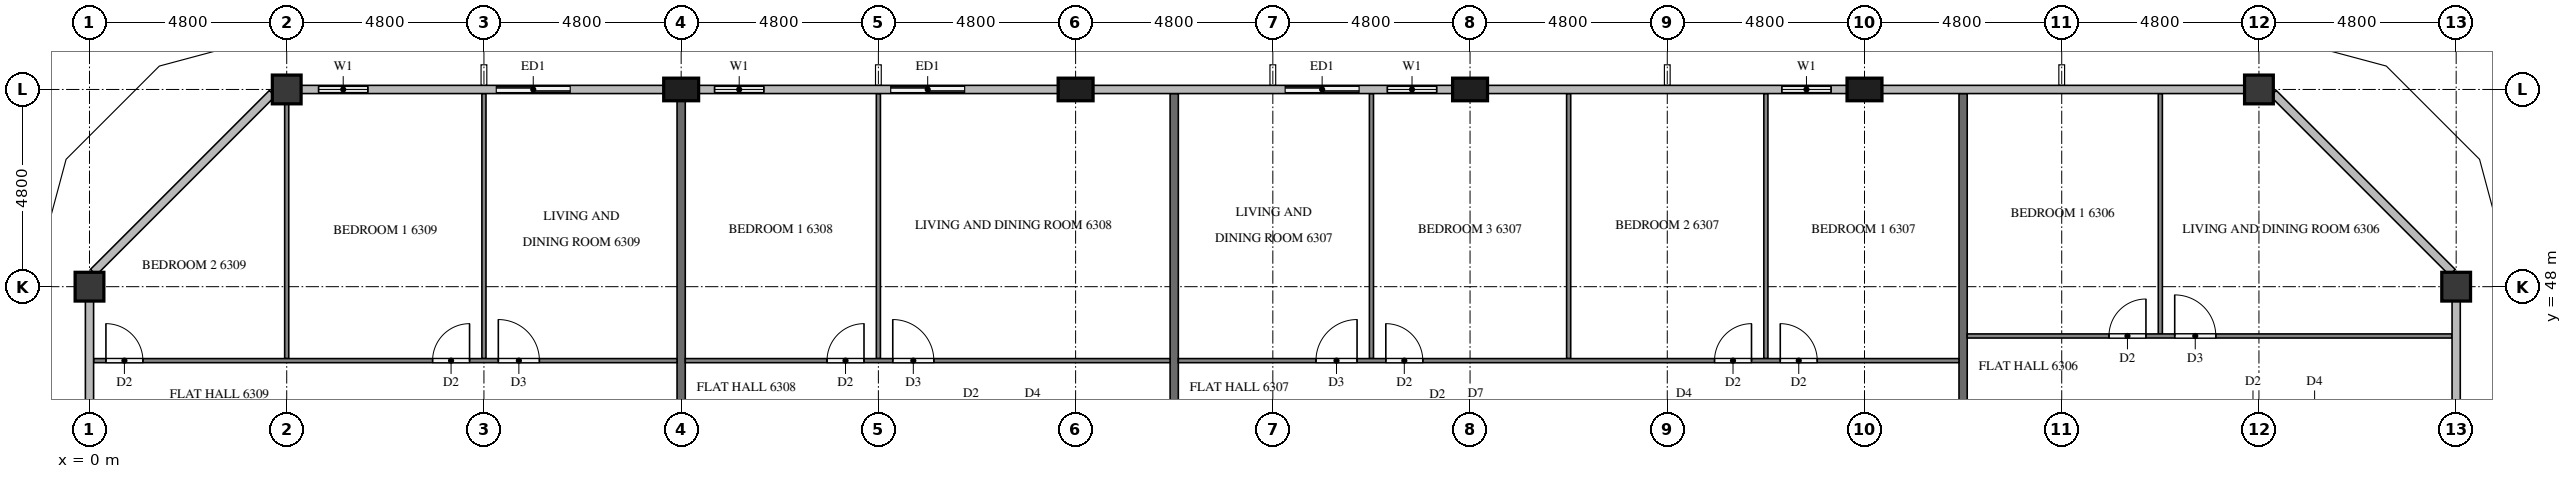
"""IFC4 building model, lengths in metres.
Left out: names, types, materials, properties, quantities, classifications, styles, units other than length and angle.
Written with IfcOpenShell. Run it as: python <this file> out.ifc"""

import sys

from ifc_helpers import new_model, si_unit, direction, frame, frame_2d, origin, origin_2d, place, context, subcontext, project, spatial, rectangle, extrude, element, fill, save


model = new_model("IFC4")
c1 = context("Model", 3, precision=1e-05, world=origin(), true_north=direction((0.0, 1.0)))
c2 = subcontext(c1, "Body", "Model", "MODEL_VIEW")
j1 = project(units=[si_unit("LENGTHUNIT", "METRE"), si_unit("PLANEANGLEUNIT", "RADIAN")], contexts=[c1])
p1 = place(None, origin())
s1 = spatial("IfcSite", under=j1, at=p1, CompositionType="ELEMENT")
p2 = place(p1, origin())
s2 = spatial("IfcBuilding", under=s1, at=p2, CompositionType="ELEMENT")
p3 = place(p2, frame((0.0, 0.0, 242.2)))
s3 = spatial("IfcBuildingStorey", under=s2, at=p3, CompositionType="ELEMENT", Elevation=242.2)
for number, where, z_axis, x_axis in (
    (1, (57.6, 48.0, 0.0), (0.0, 0.0, 1.0), (1.0, 0.0, 0.0)),
    (2, (52.8, 52.8, 0.0), (0.0, 0.0, 1.0), (1.0, 0.0, 0.0)),
):
    element("IfcColumn", number, at=place(p3, frame(where, z_axis=z_axis, x_axis=x_axis)), inside=s3, PredefinedType="COLUMN", context=c2, shape_type="SweptSolid", body=[
        extrude(rectangle(XDim=0.7, YDim=0.7, at=origin_2d()), origin(), (0.0, 0.0, 1.0), 3.2),
    ])
for number, where, z_axis, x_axis in (
    (3, (43.2, 52.8, 0.0), (0.0, 0.0, 1.0), (1.0, 0.0, 0.0)),
    (4, (33.6, 52.8, 0.0), (0.0, 0.0, 1.0), (1.0, 0.0, 0.0)),
    (5, (24.0, 52.8, 0.0), (0.0, 0.0, 1.0), (1.0, 0.0, 0.0)),
    (6, (14.4, 52.8, 0.0), (0.0, 0.0, 1.0), (1.0, 0.0, 0.0)),
):
    element("IfcColumn", number, at=place(p3, frame(where, z_axis=z_axis, x_axis=x_axis)), inside=s3, PredefinedType="COLUMN", context=c2, shape_type="SweptSolid", body=[
        extrude(rectangle(XDim=0.85, YDim=0.55, at=origin_2d()), origin(), (0.0, 0.0, 1.0), 3.2),
    ])
for number, where, z_axis, x_axis in (
    (7, (4.8, 52.8, 0.0), (0.0, 0.0, 1.0), (1.0, 0.0, 0.0)),
    (8, (0.0, 48.0, 0.0), (0.0, 0.0, 1.0), (1.0, 0.0, 0.0)),
):
    element("IfcColumn", number, at=place(p3, frame(where, z_axis=z_axis, x_axis=x_axis)), inside=s3, PredefinedType="COLUMN", context=c2, shape_type="SweptSolid", body=[
        extrude(rectangle(XDim=0.7, YDim=0.7, at=origin_2d()), origin(), (0.0, 0.0, 1.0), 3.2),
    ])
p4 = place(p3, frame((42.775, 52.8, 0.0), z_axis=(0.0, 0.0, 1.0), x_axis=(-1.0, 0.0, 0.0)))
e9 = element("IfcWall", 9, at=p4, inside=s3, PredefinedType="SOLIDWALL", context=c2, shape_type="SweptSolid", body=[
    extrude(rectangle(XDim=1.975, YDim=0.15, at=frame_2d((0.987, 0.0))), origin(), (0.0, 0.0, 1.0), 3.2),
])
p5 = place(p4, frame((0.387, 0.0, 0.9)))
e10 = element("IfcOpeningElement", 10, at=p5, cuts=e9, PredefinedType="OPENING", context=c2, shape_type="SweptSolid", body=[
    extrude(rectangle(XDim=1.2, YDim=1.4, at=frame_2d((0.6, 0.7))), frame((0.0, 0.085, 0.0), z_axis=(0.0, -1.0, 0.0), x_axis=(1.0, 0.0, 0.0)), (0.0, 0.0, 1.0), 0.17),
])
p6 = place(p3, frame((33.175, 52.8, 0.0), z_axis=(0.0, 0.0, 1.0), x_axis=(-1.0, 0.0, 0.0)))
e11 = element("IfcWall", 11, at=p6, inside=s3, PredefinedType="SOLIDWALL", context=c2, shape_type="SweptSolid", body=[
    extrude(rectangle(XDim=4.375, YDim=0.15, at=frame_2d((2.188, 0.0))), origin(), (0.0, 0.0, 1.0), 3.2),
])
p7 = place(p6, frame((0.387, 0.0, 0.9)))
e12 = element("IfcOpeningElement", 12, at=p7, cuts=e11, PredefinedType="OPENING", context=c2, shape_type="SweptSolid", body=[
    extrude(rectangle(XDim=1.2, YDim=1.4, at=frame_2d((0.6, 0.7))), frame((0.0, 0.085, 0.0), z_axis=(0.0, -1.0, 0.0), x_axis=(1.0, 0.0, 0.0)), (0.0, 0.0, 1.0), 0.17),
])
p8 = place(p6, frame((2.275, 0.0, 0.0)))
e13 = element("IfcOpeningElement", 13, at=p8, cuts=e11, PredefinedType="OPENING", context=c2, shape_type="SweptSolid", body=[
    extrude(rectangle(XDim=1.8, YDim=2.4, at=frame_2d((0.9, 1.2))), frame((0.0, 0.085, 0.0), z_axis=(0.0, -1.0, 0.0), x_axis=(1.0, 0.0, 0.0)), (0.0, 0.0, 1.0), 0.17),
])
p9 = place(p3, frame((21.6, 52.8, 0.0), z_axis=(0.0, 0.0, 1.0), x_axis=(-1.0, 0.0, 0.0)))
e14 = element("IfcWall", 14, at=p9, inside=s3, PredefinedType="SOLIDWALL", context=c2, shape_type="SweptSolid", body=[
    extrude(rectangle(XDim=2.4, YDim=0.15, at=frame_2d((1.2, 0.0))), origin(), (0.0, 0.0, 1.0), 3.2),
])
p10 = place(p9, frame((0.3, 0.0, 0.0)))
e15 = element("IfcOpeningElement", 15, at=p10, cuts=e14, PredefinedType="OPENING", context=c2, shape_type="SweptSolid", body=[
    extrude(rectangle(XDim=1.8, YDim=2.4, at=frame_2d((0.9, 1.2))), frame((0.0, 0.085, 0.0), z_axis=(0.0, -1.0, 0.0), x_axis=(1.0, 0.0, 0.0)), (0.0, 0.0, 1.0), 0.17),
])
p11 = place(p3, frame((16.8, 52.8, 0.0), z_axis=(0.0, 0.0, 1.0), x_axis=(-1.0, 0.0, 0.0)))
e16 = element("IfcWall", 16, at=p11, inside=s3, PredefinedType="SOLIDWALL", context=c2, shape_type="SweptSolid", body=[
    extrude(rectangle(XDim=1.975, YDim=0.15, at=frame_2d((0.988, 0.0))), origin(), (0.0, 0.0, 1.0), 3.2),
])
p12 = place(p11, frame((0.387, 0.0, 0.9)))
e17 = element("IfcOpeningElement", 17, at=p12, cuts=e16, PredefinedType="OPENING", context=c2, shape_type="SweptSolid", body=[
    extrude(rectangle(XDim=1.2, YDim=1.4, at=frame_2d((0.6, 0.7))), frame((0.0, 0.085, 0.0), z_axis=(0.0, -1.0, 0.0), x_axis=(1.0, 0.0, 0.0)), (0.0, 0.0, 1.0), 0.17),
])
p13 = place(p3, frame((12.0, 52.8, 0.0), z_axis=(0.0, 0.0, 1.0), x_axis=(-1.0, 0.0, 0.0)))
e18 = element("IfcWall", 18, at=p13, inside=s3, PredefinedType="SOLIDWALL", context=c2, shape_type="SweptSolid", body=[
    extrude(rectangle(XDim=2.4, YDim=0.15, at=frame_2d((1.2, 0.0))), origin(), (0.0, 0.0, 1.0), 3.2),
])
p14 = place(p13, frame((0.3, 0.0, 0.0)))
e19 = element("IfcOpeningElement", 19, at=p14, cuts=e18, PredefinedType="OPENING", context=c2, shape_type="SweptSolid", body=[
    extrude(rectangle(XDim=1.8, YDim=2.4, at=frame_2d((0.9, 1.2))), frame((0.0, 0.085, 0.0), z_axis=(0.0, -1.0, 0.0), x_axis=(1.0, 0.0, 0.0)), (0.0, 0.0, 1.0), 0.17),
])
p15 = place(p3, frame((7.2, 52.8, 0.0), z_axis=(0.0, 0.0, 1.0), x_axis=(-1.0, 0.0, 0.0)))
e20 = element("IfcWall", 20, at=p15, inside=s3, PredefinedType="SOLIDWALL", context=c2, shape_type="SweptSolid", body=[
    extrude(rectangle(XDim=2.05, YDim=0.15, at=frame_2d((1.025, 0.0))), origin(), (0.0, 0.0, 1.0), 3.2),
])
p16 = place(p15, frame((0.425, 0.0, 0.9)))
e21 = element("IfcOpeningElement", 21, at=p16, cuts=e20, PredefinedType="OPENING", context=c2, shape_type="SweptSolid", body=[
    extrude(rectangle(XDim=1.2, YDim=1.4, at=frame_2d((0.6, 0.7))), frame((0.0, 0.085, 0.0), z_axis=(0.0, -1.0, 0.0), x_axis=(1.0, 0.0, 0.0)), (0.0, 0.0, 1.0), 0.17),
])
for number, where, z_axis, x_axis in (
    (22, (45.6, 52.7, 0.0), (0.0, 0.0, 1.0), (0.0, -1.0, 0.0)),
    (23, (26.4, 52.7, 0.0), (0.0, 0.0, 1.0), (0.0, -1.0, 0.0)),
):
    element("IfcWall", number, at=place(p3, frame(where, z_axis=z_axis, x_axis=x_axis)), inside=s3, PredefinedType="PARTITIONING", context=c2, shape_type="SweptSolid", body=[
        extrude(rectangle(XDim=11.8, YDim=0.2, at=frame_2d((5.9, 0.0))), origin(), (0.0, 0.0, 1.0), 3.2),
    ])
p17 = place(p3, frame((14.4, 52.525, 0.0), z_axis=(0.0, 0.0, 1.0), x_axis=(0.0, -1.0, 0.0)))
e24 = element("IfcWall", 24, at=p17, inside=s3, PredefinedType="PARTITIONING", context=c2, shape_type="SweptSolid", body=[
    extrude(rectangle(XDim=11.625, YDim=0.2, at=frame_2d((5.812, 0.0))), origin(), (0.0, 0.0, 1.0), 3.2),
])
p18 = place(p3, frame((50.4, 46.85, 0.0), z_axis=(0.0, 0.0, 1.0), x_axis=(0.0, 1.0, 0.0)))
e25 = element("IfcWall", 25, at=p18, inside=s3, PredefinedType="PARTITIONING", context=c2, shape_type="SweptSolid", body=[
    extrude(rectangle(XDim=5.85, YDim=0.1, at=frame_2d((2.925, 0.0))), origin(), (0.0, 0.0, 1.0), 3.2),
])
p19 = place(p3, frame((45.7, 46.8, 0.0), z_axis=(0.0, 0.0, 1.0), x_axis=(1.0, 0.0, 0.0)))
e26 = element("IfcWall", 26, at=p19, inside=s3, PredefinedType="PARTITIONING", context=c2, shape_type="SweptSolid", body=[
    extrude(rectangle(XDim=11.8, YDim=0.1, at=frame_2d((5.9, 0.0))), origin(), (0.0, 0.0, 1.0), 3.2),
])
p20 = place(p19, frame((3.45, 0.0, 0.0)))
e27 = element("IfcOpeningElement", 27, at=p20, cuts=e26, PredefinedType="OPENING", context=c2, shape_type="SweptSolid", body=[
    extrude(rectangle(XDim=0.9, YDim=2.1, at=frame_2d((0.45, 1.05))), frame((0.0, 0.06, 0.0), z_axis=(0.0, -1.0, 0.0), x_axis=(1.0, 0.0, 0.0)), (0.0, 0.0, 1.0), 0.12),
])
p21 = place(p19, frame((5.05, 0.0, 0.0)))
e28 = element("IfcOpeningElement", 28, at=p21, cuts=e26, PredefinedType="OPENING", context=c2, shape_type="SweptSolid", body=[
    extrude(rectangle(XDim=1.0, YDim=2.1, at=frame_2d((0.5, 1.05))), frame((0.0, 0.06, 0.0), z_axis=(0.0, -1.0, 0.0), x_axis=(1.0, 0.0, 0.0)), (0.0, 0.0, 1.0), 0.12),
])
for number, where, z_axis, x_axis in (
    (29, (40.8, 46.25, 0.0), (0.0, 0.0, 1.0), (0.0, 1.0, 0.0)),
    (30, (36.0, 46.25, 0.0), (0.0, 0.0, 1.0), (0.0, 1.0, 0.0)),
    (31, (31.2, 46.25, 0.0), (0.0, 0.0, 1.0), (0.0, 1.0, 0.0)),
):
    element("IfcWall", number, at=place(p3, frame(where, z_axis=z_axis, x_axis=x_axis)), inside=s3, PredefinedType="PARTITIONING", context=c2, shape_type="SweptSolid", body=[
        extrude(rectangle(XDim=6.45, YDim=0.1, at=frame_2d((3.225, 0.0))), origin(), (0.0, 0.0, 1.0), 3.2),
    ])
p22 = place(p3, frame((26.5, 46.2, 0.0), z_axis=(0.0, 0.0, 1.0), x_axis=(1.0, 0.0, 0.0)))
e32 = element("IfcWall", 32, at=p22, inside=s3, PredefinedType="PARTITIONING", context=c2, shape_type="SweptSolid", body=[
    extrude(rectangle(XDim=19.0, YDim=0.1, at=frame_2d((9.5, 0.0))), origin(), (0.0, 0.0, 1.0), 3.2),
])
p23 = place(p22, frame((14.65, 0.0, 0.0)))
e33 = element("IfcOpeningElement", 33, at=p23, cuts=e32, PredefinedType="OPENING", context=c2, shape_type="SweptSolid", body=[
    extrude(rectangle(XDim=0.9, YDim=2.1, at=frame_2d((0.45, 1.05))), frame((0.0, 0.06, 0.0), z_axis=(0.0, -1.0, 0.0), x_axis=(1.0, 0.0, 0.0)), (0.0, 0.0, 1.0), 0.12),
])
p24 = place(p22, frame((13.05, 0.0, 0.0)))
e34 = element("IfcOpeningElement", 34, at=p24, cuts=e32, PredefinedType="OPENING", context=c2, shape_type="SweptSolid", body=[
    extrude(rectangle(XDim=0.9, YDim=2.1, at=frame_2d((0.45, 1.05))), frame((0.0, 0.06, 0.0), z_axis=(0.0, -1.0, 0.0), x_axis=(1.0, 0.0, 0.0)), (0.0, 0.0, 1.0), 0.12),
])
p25 = place(p22, frame((5.05, 0.0, 0.0)))
e35 = element("IfcOpeningElement", 35, at=p25, cuts=e32, PredefinedType="OPENING", context=c2, shape_type="SweptSolid", body=[
    extrude(rectangle(XDim=0.9, YDim=2.1, at=frame_2d((0.45, 1.05))), frame((0.0, 0.06, 0.0), z_axis=(0.0, -1.0, 0.0), x_axis=(1.0, 0.0, 0.0)), (0.0, 0.0, 1.0), 0.12),
])
p26 = place(p22, frame((3.35, 0.0, 0.0)))
e36 = element("IfcOpeningElement", 36, at=p26, cuts=e32, PredefinedType="OPENING", context=c2, shape_type="SweptSolid", body=[
    extrude(rectangle(XDim=1.0, YDim=2.1, at=frame_2d((0.5, 1.05))), frame((0.0, 0.06, 0.0), z_axis=(0.0, -1.0, 0.0), x_axis=(1.0, 0.0, 0.0)), (0.0, 0.0, 1.0), 0.12),
])
p27 = place(p3, frame((19.2, 46.25, 0.0), z_axis=(0.0, 0.0, 1.0), x_axis=(0.0, 1.0, 0.0)))
e37 = element("IfcWall", 37, at=p27, inside=s3, PredefinedType="PARTITIONING", context=c2, shape_type="SweptSolid", body=[
    extrude(rectangle(XDim=6.45, YDim=0.1, at=frame_2d((3.225, 0.0))), origin(), (0.0, 0.0, 1.0), 3.2),
])
p28 = place(p3, frame((14.5, 46.2, 0.0), z_axis=(0.0, 0.0, 1.0), x_axis=(1.0, 0.0, 0.0)))
e38 = element("IfcWall", 38, at=p28, inside=s3, PredefinedType="PARTITIONING", context=c2, shape_type="SweptSolid", body=[
    extrude(rectangle(XDim=11.8, YDim=0.1, at=frame_2d((5.9, 0.0))), origin(), (0.0, 0.0, 1.0), 3.2),
])
p29 = place(p28, frame((3.45, 0.0, 0.0)))
e39 = element("IfcOpeningElement", 39, at=p29, cuts=e38, PredefinedType="OPENING", context=c2, shape_type="SweptSolid", body=[
    extrude(rectangle(XDim=0.9, YDim=2.1, at=frame_2d((0.45, 1.05))), frame((0.0, 0.06, 0.0), z_axis=(0.0, -1.0, 0.0), x_axis=(1.0, 0.0, 0.0)), (0.0, 0.0, 1.0), 0.12),
])
p30 = place(p28, frame((5.05, 0.0, 0.0)))
e40 = element("IfcOpeningElement", 40, at=p30, cuts=e38, PredefinedType="OPENING", context=c2, shape_type="SweptSolid", body=[
    extrude(rectangle(XDim=1.0, YDim=2.1, at=frame_2d((0.5, 1.05))), frame((0.0, 0.06, 0.0), z_axis=(0.0, -1.0, 0.0), x_axis=(1.0, 0.0, 0.0)), (0.0, 0.0, 1.0), 0.12),
])
p31 = place(p3, frame((9.6, 46.25, 0.0), z_axis=(0.0, 0.0, 1.0), x_axis=(0.0, 1.0, 0.0)))
e41 = element("IfcWall", 41, at=p31, inside=s3, PredefinedType="PARTITIONING", context=c2, shape_type="SweptSolid", body=[
    extrude(rectangle(XDim=6.45, YDim=0.1, at=frame_2d((3.225, 0.0))), origin(), (0.0, 0.0, 1.0), 3.2),
])
p32 = place(p3, frame((4.8, 46.25, 0.0), z_axis=(0.0, 0.0, 1.0), x_axis=(0.0, 1.0, 0.0)))
e42 = element("IfcWall", 42, at=p32, inside=s3, PredefinedType="PARTITIONING", context=c2, shape_type="SweptSolid", body=[
    extrude(rectangle(XDim=6.2, YDim=0.1, at=frame_2d((3.1, 0.0))), origin(), (0.0, 0.0, 1.0), 3.2),
])
p33 = place(p3, frame((0.1, 46.2, 0.0), z_axis=(0.0, 0.0, 1.0), x_axis=(1.0, 0.0, 0.0)))
e43 = element("IfcWall", 43, at=p33, inside=s3, PredefinedType="PARTITIONING", context=c2, shape_type="SweptSolid", body=[
    extrude(rectangle(XDim=14.2, YDim=0.1, at=frame_2d((7.1, 0.0))), origin(), (0.0, 0.0, 1.0), 3.2),
])
p34 = place(p33, frame((9.85, 0.0, 0.0)))
e44 = element("IfcOpeningElement", 44, at=p34, cuts=e43, PredefinedType="OPENING", context=c2, shape_type="SweptSolid", body=[
    extrude(rectangle(XDim=1.0, YDim=2.1, at=frame_2d((0.5, 1.05))), frame((0.0, 0.06, 0.0), z_axis=(0.0, -1.0, 0.0), x_axis=(1.0, 0.0, 0.0)), (0.0, 0.0, 1.0), 0.12),
])
p35 = place(p33, frame((8.25, 0.0, 0.0)))
e45 = element("IfcOpeningElement", 45, at=p35, cuts=e43, PredefinedType="OPENING", context=c2, shape_type="SweptSolid", body=[
    extrude(rectangle(XDim=0.9, YDim=2.1, at=frame_2d((0.45, 1.05))), frame((0.0, 0.06, 0.0), z_axis=(0.0, -1.0, 0.0), x_axis=(1.0, 0.0, 0.0)), (0.0, 0.0, 1.0), 0.12),
])
p36 = place(p33, frame((0.3, 0.0, 0.0)))
e46 = element("IfcOpeningElement", 46, at=p36, cuts=e43, PredefinedType="OPENING", context=c2, shape_type="SweptSolid", body=[
    extrude(rectangle(XDim=0.9, YDim=2.1, at=frame_2d((0.45, 1.05))), frame((0.0, 0.06, 0.0), z_axis=(0.0, -1.0, 0.0), x_axis=(1.0, 0.0, 0.0)), (0.0, 0.0, 1.0), 0.12),
])
p37 = place(p5, origin())
e47 = element("IfcWindow", 47, at=p37, inside=s3, PartitioningType="SINGLE_PANEL", PredefinedType="WINDOW", context=c2, shape_type="SweptSolid", body=[
    extrude(rectangle(XDim=1.2, YDim=1.4, at=frame_2d((0.6, 0.7))), frame((0.0, 0.03, 0.0), z_axis=(0.0, -1.0, 0.0), x_axis=(1.0, 0.0, 0.0)), (0.0, 0.0, 1.0), 0.06),
])
fill(e10, e47)
p38 = place(p7, origin())
e48 = element("IfcWindow", 48, at=p38, inside=s3, PartitioningType="SINGLE_PANEL", PredefinedType="WINDOW", context=c2, shape_type="SweptSolid", body=[
    extrude(rectangle(XDim=1.2, YDim=1.4, at=frame_2d((0.6, 0.7))), frame((0.0, 0.03, 0.0), z_axis=(0.0, -1.0, 0.0), x_axis=(1.0, 0.0, 0.0)), (0.0, 0.0, 1.0), 0.06),
])
fill(e12, e48)
p39 = place(p8, origin())
e49 = element("IfcDoor", 49, at=p39, inside=s3, OperationType="SLIDING_TO_RIGHT", PredefinedType="DOOR", context=c2, shape_type="SweptSolid", body=[
    extrude(rectangle(XDim=1.8, YDim=2.4, at=frame_2d((0.9, 1.2))), frame((0.0, 0.025, 0.0), z_axis=(0.0, -1.0, 0.0), x_axis=(1.0, 0.0, 0.0)), (0.0, 0.0, 1.0), 0.05),
])
fill(e13, e49)
p40 = place(p10, origin())
e50 = element("IfcDoor", 50, at=p40, inside=s3, OperationType="SLIDING_TO_LEFT", PredefinedType="DOOR", context=c2, shape_type="SweptSolid", body=[
    extrude(rectangle(XDim=1.8, YDim=2.4, at=frame_2d((0.9, 1.2))), frame((0.0, 0.025, 0.0), z_axis=(0.0, -1.0, 0.0), x_axis=(1.0, 0.0, 0.0)), (0.0, 0.0, 1.0), 0.05),
])
fill(e15, e50)
p41 = place(p12, origin())
e51 = element("IfcWindow", 51, at=p41, inside=s3, PartitioningType="SINGLE_PANEL", PredefinedType="WINDOW", context=c2, shape_type="SweptSolid", body=[
    extrude(rectangle(XDim=1.2, YDim=1.4, at=frame_2d((0.6, 0.7))), frame((0.0, 0.03, 0.0), z_axis=(0.0, -1.0, 0.0), x_axis=(1.0, 0.0, 0.0)), (0.0, 0.0, 1.0), 0.06),
])
fill(e17, e51)
p42 = place(p14, origin())
e52 = element("IfcDoor", 52, at=p42, inside=s3, OperationType="SLIDING_TO_RIGHT", PredefinedType="DOOR", context=c2, shape_type="SweptSolid", body=[
    extrude(rectangle(XDim=1.8, YDim=2.4, at=frame_2d((0.9, 1.2))), frame((0.0, 0.025, 0.0), z_axis=(0.0, -1.0, 0.0), x_axis=(1.0, 0.0, 0.0)), (0.0, 0.0, 1.0), 0.05),
])
fill(e19, e52)
p43 = place(p16, origin())
e53 = element("IfcWindow", 53, at=p43, inside=s3, PartitioningType="SINGLE_PANEL", PredefinedType="WINDOW", context=c2, shape_type="SweptSolid", body=[
    extrude(rectangle(XDim=1.2, YDim=1.4, at=frame_2d((0.6, 0.7))), frame((0.0, 0.03, 0.0), z_axis=(0.0, -1.0, 0.0), x_axis=(1.0, 0.0, 0.0)), (0.0, 0.0, 1.0), 0.06),
])
fill(e21, e53)
p44 = place(p20, origin())
e54 = element("IfcDoor", 54, at=p44, inside=s3, OperationType="SINGLE_SWING_RIGHT", PredefinedType="DOOR", context=c2, shape_type="SweptSolid", body=[
    extrude(rectangle(XDim=0.9, YDim=2.1, at=frame_2d((0.45, 1.05))), frame((0.0, 0.025, 0.0), z_axis=(0.0, -1.0, 0.0), x_axis=(1.0, 0.0, 0.0)), (0.0, 0.0, 1.0), 0.05),
])
fill(e27, e54)
p45 = place(p21, origin())
e55 = element("IfcDoor", 55, at=p45, inside=s3, OperationType="SINGLE_SWING_LEFT", PredefinedType="DOOR", context=c2, shape_type="SweptSolid", body=[
    extrude(rectangle(XDim=1.0, YDim=2.1, at=frame_2d((0.5, 1.05))), frame((0.0, 0.025, 0.0), z_axis=(0.0, -1.0, 0.0), x_axis=(1.0, 0.0, 0.0)), (0.0, 0.0, 1.0), 0.05),
])
fill(e28, e55)
p46 = place(p23, origin())
e56 = element("IfcDoor", 56, at=p46, inside=s3, OperationType="SINGLE_SWING_LEFT", PredefinedType="DOOR", context=c2, shape_type="SweptSolid", body=[
    extrude(rectangle(XDim=0.9, YDim=2.1, at=frame_2d((0.45, 1.05))), frame((0.0, 0.025, 0.0), z_axis=(0.0, -1.0, 0.0), x_axis=(1.0, 0.0, 0.0)), (0.0, 0.0, 1.0), 0.05),
])
fill(e33, e56)
p47 = place(p24, origin())
e57 = element("IfcDoor", 57, at=p47, inside=s3, OperationType="SINGLE_SWING_RIGHT", PredefinedType="DOOR", context=c2, shape_type="SweptSolid", body=[
    extrude(rectangle(XDim=0.9, YDim=2.1, at=frame_2d((0.45, 1.05))), frame((0.0, 0.025, 0.0), z_axis=(0.0, -1.0, 0.0), x_axis=(1.0, 0.0, 0.0)), (0.0, 0.0, 1.0), 0.05),
])
fill(e34, e57)
p48 = place(p25, origin())
e58 = element("IfcDoor", 58, at=p48, inside=s3, OperationType="SINGLE_SWING_LEFT", PredefinedType="DOOR", context=c2, shape_type="SweptSolid", body=[
    extrude(rectangle(XDim=0.9, YDim=2.1, at=frame_2d((0.45, 1.05))), frame((0.0, 0.025, 0.0), z_axis=(0.0, -1.0, 0.0), x_axis=(1.0, 0.0, 0.0)), (0.0, 0.0, 1.0), 0.05),
])
fill(e35, e58)
p49 = place(p26, origin())
e59 = element("IfcDoor", 59, at=p49, inside=s3, OperationType="SINGLE_SWING_RIGHT", PredefinedType="DOOR", context=c2, shape_type="SweptSolid", body=[
    extrude(rectangle(XDim=1.0, YDim=2.1, at=frame_2d((0.5, 1.05))), frame((0.0, 0.025, 0.0), z_axis=(0.0, -1.0, 0.0), x_axis=(1.0, 0.0, 0.0)), (0.0, 0.0, 1.0), 0.05),
])
fill(e36, e59)
p50 = place(p29, origin())
e60 = element("IfcDoor", 60, at=p50, inside=s3, OperationType="SINGLE_SWING_RIGHT", PredefinedType="DOOR", context=c2, shape_type="SweptSolid", body=[
    extrude(rectangle(XDim=0.9, YDim=2.1, at=frame_2d((0.45, 1.05))), frame((0.0, 0.025, 0.0), z_axis=(0.0, -1.0, 0.0), x_axis=(1.0, 0.0, 0.0)), (0.0, 0.0, 1.0), 0.05),
])
fill(e39, e60)
p51 = place(p30, origin())
e61 = element("IfcDoor", 61, at=p51, inside=s3, OperationType="SINGLE_SWING_LEFT", PredefinedType="DOOR", context=c2, shape_type="SweptSolid", body=[
    extrude(rectangle(XDim=1.0, YDim=2.1, at=frame_2d((0.5, 1.05))), frame((0.0, 0.025, 0.0), z_axis=(0.0, -1.0, 0.0), x_axis=(1.0, 0.0, 0.0)), (0.0, 0.0, 1.0), 0.05),
])
fill(e40, e61)
p52 = place(p34, origin())
e62 = element("IfcDoor", 62, at=p52, inside=s3, OperationType="SINGLE_SWING_LEFT", PredefinedType="DOOR", context=c2, shape_type="SweptSolid", body=[
    extrude(rectangle(XDim=1.0, YDim=2.1, at=frame_2d((0.5, 1.05))), frame((0.0, 0.025, 0.0), z_axis=(0.0, -1.0, 0.0), x_axis=(1.0, 0.0, 0.0)), (0.0, 0.0, 1.0), 0.05),
])
fill(e44, e62)
p53 = place(p35, origin())
e63 = element("IfcDoor", 63, at=p53, inside=s3, OperationType="SINGLE_SWING_RIGHT", PredefinedType="DOOR", context=c2, shape_type="SweptSolid", body=[
    extrude(rectangle(XDim=0.9, YDim=2.1, at=frame_2d((0.45, 1.05))), frame((0.0, 0.025, 0.0), z_axis=(0.0, -1.0, 0.0), x_axis=(1.0, 0.0, 0.0)), (0.0, 0.0, 1.0), 0.05),
])
fill(e45, e63)
p54 = place(p36, origin())
e64 = element("IfcDoor", 64, at=p54, inside=s3, OperationType="SINGLE_SWING_LEFT", PredefinedType="DOOR", context=c2, shape_type="SweptSolid", body=[
    extrude(rectangle(XDim=0.9, YDim=2.1, at=frame_2d((0.45, 1.05))), frame((0.0, 0.025, 0.0), z_axis=(0.0, -1.0, 0.0), x_axis=(1.0, 0.0, 0.0)), (0.0, 0.0, 1.0), 0.05),
])
fill(e46, e64)
save(model, sys.argv[1])
